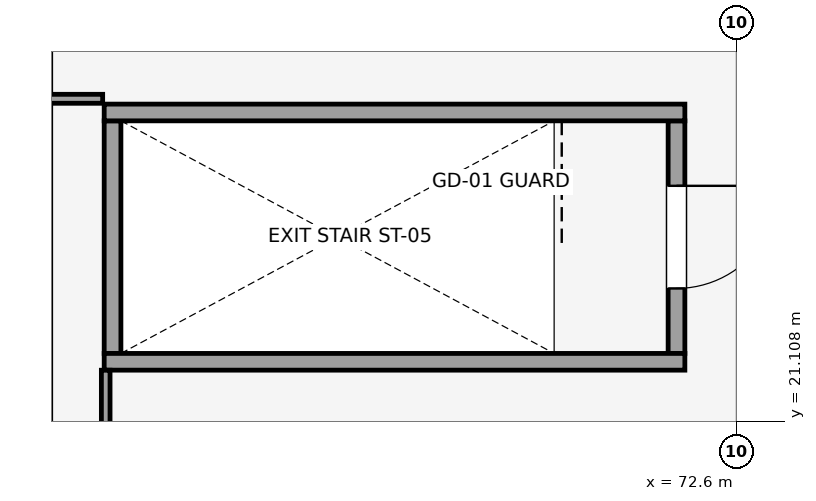
"""IFC4 building model, lengths in metres.
Left out: names, types, materials, properties, quantities, classifications, styles, units other than length and angle.
Written with IfcOpenShell. Run it as: python <this file> out.ifc"""

import sys

from ifc_helpers import new_model, si_unit, direction, frame, frame_2d, origin, place, context, subcontext, project, spatial, rectangle, extrude, element, fill, save


model = new_model("IFC4")
c1 = context("Model", 3, precision=1e-05, world=origin(), true_north=direction((0.0, 1.0)))
c2 = subcontext(c1, "Body", "Model", "MODEL_VIEW")
j1 = project(units=[si_unit("LENGTHUNIT", "METRE"), si_unit("PLANEANGLEUNIT", "RADIAN")], contexts=[c1])
p1 = place(None, origin())
s1 = spatial("IfcSite", under=j1, at=p1, CompositionType="ELEMENT")
p2 = place(p1, origin())
s2 = spatial("IfcBuilding", under=s1, at=p2, CompositionType="ELEMENT")
p3 = place(p2, frame((0.0, 0.0, 9.0)))
s3 = spatial("IfcBuildingStorey", under=s2, at=p3, CompositionType="ELEMENT", Elevation=9.0)
p4 = place(p3, frame((71.81, 25.06, 0.0), z_axis=(0.0, 0.0, 1.0), x_axis=(0.0, -1.0, 0.0)))
e1 = element("IfcWall", 1, at=p4, inside=s3, PredefinedType="SHEAR", context=c2, shape_type="SweptSolid", body=[
    extrude(rectangle(XDim=3.06, YDim=0.22, at=frame_2d((1.53, 0.0))), origin(), (0.0, 0.0, 1.0), 4.8),
])
p5 = place(p4, frame((0.855, 0.0, 0.0)))
e2 = element("IfcOpeningElement", 2, at=p5, cuts=e1, PredefinedType="OPENING", context=c2, shape_type="SweptSolid", body=[
    extrude(rectangle(XDim=1.35, YDim=2.15, at=frame_2d((0.675, 1.075))), frame((0.0, 0.12, 0.0), z_axis=(0.0, -1.0, 0.0), x_axis=(1.0, 0.0, 0.0)), (0.0, 0.0, 1.0), 0.24),
])
p6 = place(p3, frame((64.39, 25.06, 0.0), z_axis=(0.0, 0.0, 1.0), x_axis=(0.0, -1.0, 0.0)))
e3 = element("IfcWall", 3, at=p6, inside=s3, PredefinedType="SHEAR", context=c2, shape_type="SweptSolid", body=[
    extrude(rectangle(XDim=3.06, YDim=0.22, at=frame_2d((1.53, 0.0))), origin(), (0.0, 0.0, 1.0), 4.8),
])
for number, where, z_axis, x_axis in (
    (4, (71.92, 25.17, 0.0), (0.0, 0.0, 1.0), (-1.0, 0.0, 0.0)),
    (5, (71.92, 21.89, 0.0), (0.0, 0.0, 1.0), (-1.0, 0.0, 0.0)),
):
    element("IfcWall", number, at=place(p3, frame(where, z_axis=z_axis, x_axis=x_axis)), inside=s3, PredefinedType="SHEAR", context=c2, shape_type="SweptSolid", body=[
        extrude(rectangle(XDim=7.64, YDim=0.22, at=frame_2d((3.82, 0.0))), origin(), (0.0, 0.0, 1.0), 4.8),
    ])
p7 = place(p3, frame((61.401, 25.35, 0.0), z_axis=(0.0, 0.0, 1.0), x_axis=(1.0, 0.0, 0.0)))
e6 = element("IfcWall", 6, at=p7, inside=s3, PredefinedType="PARTITIONING", context=c2, shape_type="SweptSolid", body=[
    extrude(rectangle(XDim=2.859, YDim=0.118, at=frame_2d((1.43, 0.0))), origin(), (0.0, 0.0, 1.0), 2.7),
])
p8 = place(p3, frame((64.3, 21.779, 0.0), z_axis=(0.0, 0.0, 1.0), x_axis=(0.0, -1.0, 0.0)))
e7 = element("IfcWall", 7, at=p8, inside=s3, PredefinedType="PARTITIONING", context=c2, shape_type="SweptSolid", body=[
    extrude(rectangle(XDim=3.779, YDim=0.114, at=frame_2d((1.89, 0.0))), origin(), (0.0, 0.0, 1.0), 2.7),
])
p9 = place(p5, origin())
e8 = element("IfcDoor", 8, at=p9, inside=s3, OperationType="SINGLE_SWING_LEFT", PredefinedType="DOOR", context=c2, shape_type="SweptSolid", body=[
    extrude(rectangle(XDim=1.35, YDim=2.15, at=frame_2d((0.675, 1.075))), frame((0.0, 0.025, 0.0), z_axis=(0.0, -1.0, 0.0), x_axis=(1.0, 0.0, 0.0)), (0.0, 0.0, 1.0), 0.05),
])
fill(e2, e8)
save(model, sys.argv[1])
